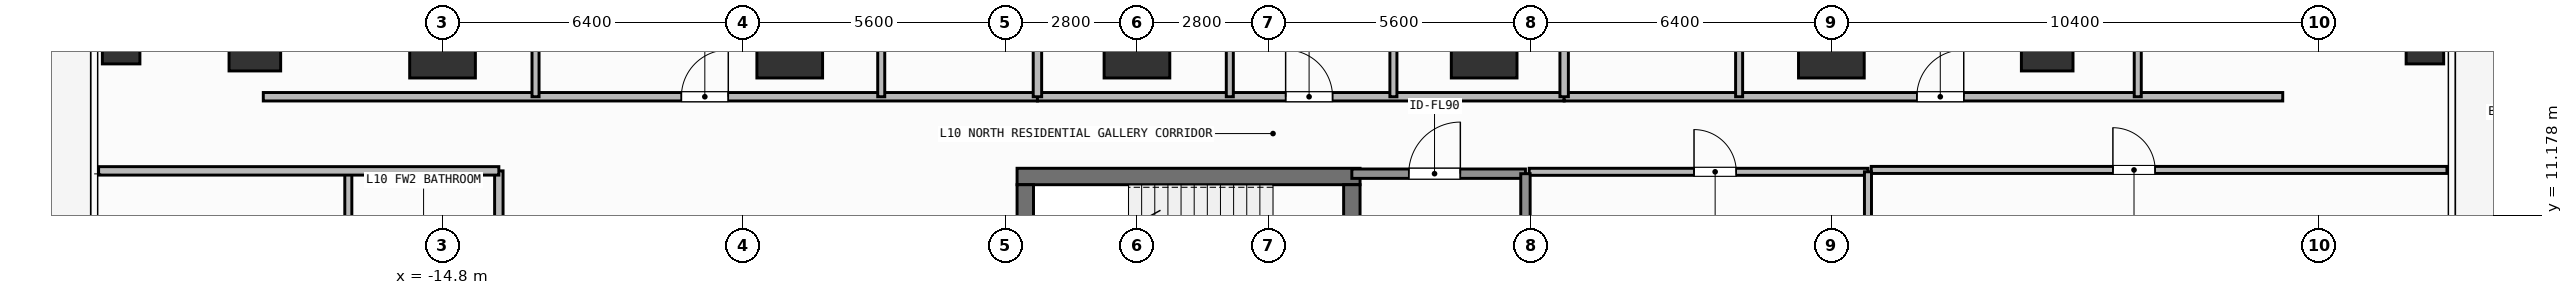
"""IFC4 building model, lengths in metres.
Left out: names, types, materials, properties, quantities, classifications, styles, units other than length and angle.
Written with IfcOpenShell. Run it as: python <this file> out.ifc"""

import sys

from ifc_helpers import new_model, si_unit, direction, frame, frame_2d, origin, origin_2d, place, context, subcontext, project, spatial, rectangle, hollow_rectangle, extrude, element, fill, save


model = new_model("IFC4")
c1 = context("Model", 3, precision=1e-05, world=origin(), true_north=direction((0.0, 1.0)))
c2 = subcontext(c1, "Body", "Model", "MODEL_VIEW")
j1 = project(units=[si_unit("LENGTHUNIT", "METRE"), si_unit("PLANEANGLEUNIT", "RADIAN")], contexts=[c1])
p1 = place(None, origin())
s1 = spatial("IfcSite", under=j1, at=p1, CompositionType="ELEMENT")
p2 = place(p1, origin())
s2 = spatial("IfcBuilding", under=s1, at=p2, CompositionType="ELEMENT")
p3 = place(p2, frame((0.0, 0.0, 38.4)))
s3 = spatial("IfcBuildingStorey", under=s2, at=p3, CompositionType="ELEMENT", Elevation=38.4)
p4 = place(p3, frame((-2.555, 12.0, 0.0), z_axis=(0.0, 0.0, 1.0), x_axis=(1.0, 0.0, 0.0)))
e1 = element("IfcWall", 1, at=p4, inside=s3, PredefinedType="SHEAR", context=c2, shape_type="SweptSolid", body=[
    extrude(rectangle(XDim=7.31, YDim=0.35, at=frame_2d((3.655, 0.0))), origin(), (0.0, 0.0, 1.0), 3.9),
])
p5 = place(p3, frame((-2.38, 8.9, 0.0), z_axis=(0.0, 0.0, 1.0), x_axis=(0.0, 1.0, 0.0)))
e2 = element("IfcWall", 2, at=p5, inside=s3, PredefinedType="SHEAR", context=c2, shape_type="SweptSolid", body=[
    extrude(rectangle(XDim=2.925, YDim=0.35, at=frame_2d((1.462, 0.0))), origin(), (0.0, 0.0, 1.0), 3.9),
])
p6 = place(p3, frame((4.58, 11.825, 0.0), z_axis=(0.0, 0.0, 1.0), x_axis=(0.0, -1.0, 0.0)))
e3 = element("IfcWall", 3, at=p6, inside=s3, PredefinedType="SHEAR", context=c2, shape_type="SweptSolid", body=[
    extrude(rectangle(XDim=2.925, YDim=0.35, at=frame_2d((1.462, 0.0))), origin(), (0.0, 0.0, 1.0), 3.9),
])
p7 = place(p6, frame((0.913, 0.0, 0.0)))
e4 = element("IfcOpeningElement", 4, at=p7, cuts=e3, PredefinedType="OPENING", context=c2, shape_type="SweptSolid", body=[
    extrude(rectangle(XDim=1.1, YDim=2.15, at=frame_2d((0.55, 1.075))), frame((0.0, 0.185, 0.0), z_axis=(0.0, -1.0, 0.0), x_axis=(1.0, 0.0, 0.0)), (0.0, 0.0, 1.0), 0.37),
])
for number, where, z_axis, x_axis in (
    (5, (-14.8, 14.8, 0.0), (0.0, 0.0, 1.0), (1.0, 0.0, 0.0)),
    (6, (-7.4, 14.8, 0.0), (0.0, 0.0, 1.0), (1.0, 0.0, 0.0)),
    (7, (0.0, 14.8, 0.0), (0.0, 0.0, 1.0), (1.0, 0.0, 0.0)),
    (8, (7.4, 14.8, 0.0), (0.0, 0.0, 1.0), (1.0, 0.0, 0.0)),
    (9, (14.8, 14.8, 0.0), (0.0, 0.0, 1.0), (1.0, 0.0, 0.0)),
):
    element("IfcColumn", number, at=place(p3, frame(where, z_axis=z_axis, x_axis=x_axis)), inside=s3, PredefinedType="COLUMN", context=c2, shape_type="SweptSolid", body=[
        extrude(rectangle(XDim=1.4, YDim=1.4, at=origin_2d()), origin(), (0.0, 0.0, 1.0), 3.9),
    ])
for number, where, z_axis, x_axis in (
    (10, (-18.8, 14.8, 0.0), (0.0, 0.0, 1.0), (1.0, 0.0, 0.0)),
    (11, (19.4, 14.8, 0.0), (0.0, 0.0, 1.0), (1.0, 0.0, 0.0)),
):
    element("IfcColumn", number, at=place(p3, frame(where, z_axis=z_axis, x_axis=x_axis)), inside=s3, PredefinedType="COLUMN", context=c2, shape_type="SweptSolid", body=[
        extrude(rectangle(XDim=1.1, YDim=1.1, at=origin_2d()), origin(), (0.0, 0.0, 1.0), 3.9),
    ])
for number, where, z_axis, x_axis in (
    (12, (-21.65, 14.8, 0.0), (0.0, 0.0, 1.0), (1.0, 0.0, 0.0)),
    (13, (27.45, 14.8, 0.0), (0.0, 0.0, 1.0), (1.0, 0.0, 0.0)),
):
    element("IfcColumn", number, at=place(p3, frame(where, z_axis=z_axis, x_axis=x_axis)), inside=s3, PredefinedType="COLUMN", context=c2, shape_type="SweptSolid", body=[
        extrude(hollow_rectangle(XDim=0.8, YDim=0.8, WallThickness=0.036, at=origin_2d()), origin(), (0.0, 0.0, 1.0), 3.9),
    ])
p8 = place(p3, frame((4.58, 12.06, 0.0), z_axis=(0.0, 0.0, 1.0), x_axis=(1.0, 0.0, 0.0)))
e14 = element("IfcWall", 14, at=p8, inside=s3, PredefinedType="SOLIDWALL", context=c2, shape_type="SweptSolid", body=[
    extrude(rectangle(XDim=3.7, YDim=0.2, at=frame_2d((1.85, 0.0))), origin(), (0.0, 0.0, 1.0), 3.68),
])
p9 = place(p8, frame((1.212, 0.0, 0.0)))
e15 = element("IfcOpeningElement", 15, at=p9, cuts=e14, PredefinedType="OPENING", context=c2, shape_type="SweptSolid", body=[
    extrude(rectangle(XDim=1.1, YDim=2.15, at=frame_2d((0.55, 1.075))), frame((0.0, 0.11, 0.0), z_axis=(0.0, -1.0, 0.0), x_axis=(1.0, 0.0, 0.0)), (0.0, 0.0, 1.0), 0.22),
])
p10 = place(p3, frame((8.36, 12.1, 0.0), z_axis=(0.0, 0.0, 1.0), x_axis=(1.0, 0.0, 0.0)))
e16 = element("IfcWall", 16, at=p10, inside=s3, PredefinedType="PARTITIONING", context=c2, shape_type="SweptSolid", body=[
    extrude(rectangle(XDim=7.22, YDim=0.15, at=frame_2d((3.61, 0.0))), origin(), (0.0, 0.0, 1.0), 3.68),
])
p11 = place(p10, frame((3.513, 0.0, 0.0)))
e17 = element("IfcOpeningElement", 17, at=p11, cuts=e16, PredefinedType="OPENING", context=c2, shape_type="SweptSolid", body=[
    extrude(rectangle(XDim=0.9, YDim=2.1, at=frame_2d((0.45, 1.05))), frame((0.0, 0.085, 0.0), z_axis=(0.0, -1.0, 0.0), x_axis=(1.0, 0.0, 0.0)), (0.0, 0.0, 1.0), 0.17),
])
p12 = place(p3, frame((-18.62, 13.7, 0.0), z_axis=(0.0, 0.0, 1.0), x_axis=(1.0, 0.0, 0.0)))
e18 = element("IfcWall", 18, at=p12, inside=s3, PredefinedType="PARTITIONING", context=c2, shape_type="SweptSolid", body=[
    extrude(rectangle(XDim=16.499, YDim=0.18, at=frame_2d((8.25, 0.0))), origin(), (0.0, 0.0, 1.0), 3.68),
])
p13 = place(p12, frame((8.91, 0.0, 0.0)))
e19 = element("IfcOpeningElement", 19, at=p13, cuts=e18, PredefinedType="OPENING", context=c2, shape_type="SweptSolid", body=[
    extrude(rectangle(XDim=1.0, YDim=2.2, at=frame_2d((0.5, 1.1))), frame((0.0, 0.1, 0.0), z_axis=(0.0, -1.0, 0.0), x_axis=(1.0, 0.0, 0.0)), (0.0, 0.0, 1.0), 0.2),
])
p14 = place(p3, frame((-12.818, 13.7, 0.0), z_axis=(0.0, 0.0, 1.0), x_axis=(0.0, 1.0, 0.0)))
e20 = element("IfcWall", 20, at=p14, inside=s3, PredefinedType="PARTITIONING", context=c2, shape_type="SweptSolid", body=[
    extrude(rectangle(XDim=7.09, YDim=0.15, at=frame_2d((3.545, 0.0))), origin(), (0.0, 0.0, 1.0), 3.68),
])
p15 = place(p14, frame((3.03, 0.0, 0.0)))
e21 = element("IfcOpeningElement", 21, at=p15, cuts=e20, PredefinedType="OPENING", context=c2, shape_type="SweptSolid", body=[
    extrude(rectangle(XDim=0.85, YDim=2.1, at=frame_2d((0.425, 1.05))), frame((0.0, 0.085, 0.0), z_axis=(0.0, -1.0, 0.0), x_axis=(1.0, 0.0, 0.0)), (0.0, 0.0, 1.0), 0.17),
])
p16 = place(p3, frame((-5.45, 13.7, 0.0), z_axis=(0.0, 0.0, 1.0), x_axis=(0.0, 1.0, 0.0)))
e22 = element("IfcWall", 22, at=p16, inside=s3, PredefinedType="PARTITIONING", context=c2, shape_type="SweptSolid", body=[
    extrude(rectangle(XDim=4.566, YDim=0.15, at=frame_2d((2.283, 0.0))), origin(), (0.0, 0.0, 1.0), 3.68),
])
p17 = place(p16, frame((1.948, 0.0, 0.0)))
e23 = element("IfcOpeningElement", 23, at=p17, cuts=e22, PredefinedType="OPENING", context=c2, shape_type="SweptSolid", body=[
    extrude(rectangle(XDim=0.85, YDim=2.1, at=frame_2d((0.425, 1.05))), frame((0.0, 0.085, 0.0), z_axis=(0.0, -1.0, 0.0), x_axis=(1.0, 0.0, 0.0)), (0.0, 0.0, 1.0), 0.17),
])
p18 = place(p3, frame((-2.121, 13.7, 0.0), z_axis=(0.0, 0.0, 1.0), x_axis=(1.0, 0.0, 0.0)))
e24 = element("IfcWall", 24, at=p18, inside=s3, PredefinedType="PARTITIONING", context=c2, shape_type="SweptSolid", body=[
    extrude(rectangle(XDim=11.226, YDim=0.18, at=frame_2d((5.613, 0.0))), origin(), (0.0, 0.0, 1.0), 3.68),
])
p19 = place(p18, frame((5.29, 0.0, 0.0)))
e25 = element("IfcOpeningElement", 25, at=p19, cuts=e24, PredefinedType="OPENING", context=c2, shape_type="SweptSolid", body=[
    extrude(rectangle(XDim=1.0, YDim=2.2, at=frame_2d((0.5, 1.1))), frame((0.0, 0.1, 0.0), z_axis=(0.0, -1.0, 0.0), x_axis=(1.0, 0.0, 0.0)), (0.0, 0.0, 1.0), 0.2),
])
p20 = place(p3, frame((1.979, 13.7, 0.0), z_axis=(0.0, 0.0, 1.0), x_axis=(0.0, 1.0, 0.0)))
e26 = element("IfcWall", 26, at=p20, inside=s3, PredefinedType="PARTITIONING", context=c2, shape_type="SweptSolid", body=[
    extrude(rectangle(XDim=7.09, YDim=0.15, at=frame_2d((3.545, 0.0))), origin(), (0.0, 0.0, 1.0), 3.68),
])
p21 = place(p20, frame((3.03, 0.0, 0.0)))
e27 = element("IfcOpeningElement", 27, at=p21, cuts=e26, PredefinedType="OPENING", context=c2, shape_type="SweptSolid", body=[
    extrude(rectangle(XDim=0.85, YDim=2.1, at=frame_2d((0.425, 1.05))), frame((0.0, 0.085, 0.0), z_axis=(0.0, -1.0, 0.0), x_axis=(1.0, 0.0, 0.0)), (0.0, 0.0, 1.0), 0.17),
])
p22 = place(p3, frame((5.466, 13.7, 0.0), z_axis=(0.0, 0.0, 1.0), x_axis=(0.0, 1.0, 0.0)))
e28 = element("IfcWall", 28, at=p22, inside=s3, PredefinedType="PARTITIONING", context=c2, shape_type="SweptSolid", body=[
    extrude(rectangle(XDim=7.09, YDim=0.15, at=frame_2d((3.545, 0.0))), origin(), (0.0, 0.0, 1.0), 3.68),
])
p23 = place(p22, frame((3.03, 0.0, 0.0)))
e29 = element("IfcOpeningElement", 29, at=p23, cuts=e28, PredefinedType="OPENING", context=c2, shape_type="SweptSolid", body=[
    extrude(rectangle(XDim=0.85, YDim=2.1, at=frame_2d((0.425, 1.05))), frame((0.0, 0.085, 0.0), z_axis=(0.0, -1.0, 0.0), x_axis=(1.0, 0.0, 0.0)), (0.0, 0.0, 1.0), 0.17),
])
p24 = place(p3, frame((9.105, 13.7, 0.0), z_axis=(0.0, 0.0, 1.0), x_axis=(1.0, 0.0, 0.0)))
e30 = element("IfcWall", 30, at=p24, inside=s3, PredefinedType="PARTITIONING", context=c2, shape_type="SweptSolid", body=[
    extrude(rectangle(XDim=15.315, YDim=0.18, at=frame_2d((7.657, 0.0))), origin(), (0.0, 0.0, 1.0), 3.68),
])
p25 = place(p24, frame((7.516, 0.0, 0.0)))
e31 = element("IfcOpeningElement", 31, at=p25, cuts=e30, PredefinedType="OPENING", context=c2, shape_type="SweptSolid", body=[
    extrude(rectangle(XDim=1.0, YDim=2.2, at=frame_2d((0.5, 1.1))), frame((0.0, 0.1, 0.0), z_axis=(0.0, -1.0, 0.0), x_axis=(1.0, 0.0, 0.0)), (0.0, 0.0, 1.0), 0.2),
])
p26 = place(p3, frame((12.834, 13.7, 0.0), z_axis=(0.0, 0.0, 1.0), x_axis=(0.0, 1.0, 0.0)))
e32 = element("IfcWall", 32, at=p26, inside=s3, PredefinedType="PARTITIONING", context=c2, shape_type="SweptSolid", body=[
    extrude(rectangle(XDim=7.09, YDim=0.15, at=frame_2d((3.545, 0.0))), origin(), (0.0, 0.0, 1.0), 3.68),
])
p27 = place(p26, frame((3.03, 0.0, 0.0)))
e33 = element("IfcOpeningElement", 33, at=p27, cuts=e32, PredefinedType="OPENING", context=c2, shape_type="SweptSolid", body=[
    extrude(rectangle(XDim=0.85, YDim=2.1, at=frame_2d((0.425, 1.05))), frame((0.0, 0.085, 0.0), z_axis=(0.0, -1.0, 0.0), x_axis=(1.0, 0.0, 0.0)), (0.0, 0.0, 1.0), 0.17),
])
p28 = place(p3, frame((21.33, 13.7, 0.0), z_axis=(0.0, 0.0, 1.0), x_axis=(0.0, 1.0, 0.0)))
e34 = element("IfcWall", 34, at=p28, inside=s3, PredefinedType="PARTITIONING", context=c2, shape_type="SweptSolid", body=[
    extrude(rectangle(XDim=4.148, YDim=0.15, at=frame_2d((2.074, 0.0))), origin(), (0.0, 0.0, 1.0), 3.68),
])
p29 = place(p28, frame((1.737, 0.0, 0.0)))
e35 = element("IfcOpeningElement", 35, at=p29, cuts=e34, PredefinedType="OPENING", context=c2, shape_type="SweptSolid", body=[
    extrude(rectangle(XDim=0.85, YDim=2.1, at=frame_2d((0.425, 1.05))), frame((0.0, 0.085, 0.0), z_axis=(0.0, -1.0, 0.0), x_axis=(1.0, 0.0, 0.0)), (0.0, 0.0, 1.0), 0.17),
])
p30 = place(p3, frame((-13.6, 0.727, 0.0), z_axis=(0.0, 0.0, 1.0), x_axis=(0.0, 1.0, 0.0)))
e36 = element("IfcWall", 36, at=p30, inside=s3, PredefinedType="PARTITIONING", context=c2, shape_type="SweptSolid", body=[
    extrude(rectangle(XDim=11.393, YDim=0.18, at=frame_2d((5.697, 0.0))), origin(), (0.0, 0.0, 1.0), 3.68),
])
p31 = place(p30, frame((4.837, 0.0, 0.0)))
e37 = element("IfcOpeningElement", 37, at=p31, cuts=e36, PredefinedType="OPENING", context=c2, shape_type="SweptSolid", body=[
    extrude(rectangle(XDim=1.0, YDim=2.2, at=frame_2d((0.5, 1.1))), frame((0.0, 0.1, 0.0), z_axis=(0.0, -1.0, 0.0), x_axis=(1.0, 0.0, 0.0)), (0.0, 0.0, 1.0), 0.2),
])
p32 = place(p3, frame((15.65, 12.14, 0.0), z_axis=(0.0, 0.0, 1.0), x_axis=(1.0, 0.0, 0.0)))
e38 = element("IfcWall", 38, at=p32, inside=s3, PredefinedType="PARTITIONING", context=c2, shape_type="SweptSolid", body=[
    extrude(rectangle(XDim=12.27, YDim=0.15, at=frame_2d((6.135, 0.0))), origin(), (0.0, 0.0, 1.0), 3.68),
])
p33 = place(p32, frame((5.15, 0.0, 0.0)))
e39 = element("IfcOpeningElement", 39, at=p33, cuts=e38, PredefinedType="OPENING", context=c2, shape_type="SweptSolid", body=[
    extrude(rectangle(XDim=0.9, YDim=2.1, at=frame_2d((0.45, 1.05))), frame((0.0, 0.085, 0.0), z_axis=(0.0, -1.0, 0.0), x_axis=(1.0, 0.0, 0.0)), (0.0, 0.0, 1.0), 0.17),
])
p34 = place(p3, frame((8.28, 8.95, 0.0), z_axis=(0.0, 0.0, 1.0), x_axis=(0.0, 1.0, 0.0)))
e40 = element("IfcWall", 40, at=p34, inside=s3, PredefinedType="SOLIDWALL", context=c2, shape_type="SweptSolid", body=[
    extrude(rectangle(XDim=3.11, YDim=0.2, at=frame_2d((1.555, 0.0))), origin(), (0.0, 0.0, 1.0), 3.68),
])
p35 = place(p3, frame((15.58, 5.85, 0.0), z_axis=(0.0, 0.0, 1.0), x_axis=(0.0, 1.0, 0.0)))
e41 = element("IfcWall", 41, at=p35, inside=s3, PredefinedType="PARTITIONING", context=c2, shape_type="SweptSolid", body=[
    extrude(rectangle(XDim=6.25, YDim=0.15, at=frame_2d((3.125, 0.0))), origin(), (0.0, 0.0, 1.0), 3.68),
])
for number, where, z_axis, x_axis in (
    (42, (-2.121, 13.7, 0.0), (0.0, 0.0, 1.0), (0.0, 1.0, 0.0)),
    (43, (9.105, 13.7, 0.0), (0.0, 0.0, 1.0), (0.0, 1.0, 0.0)),
):
    element("IfcWall", number, at=place(p3, frame(where, z_axis=z_axis, x_axis=x_axis)), inside=s3, PredefinedType="PARTITIONING", context=c2, shape_type="SweptSolid", body=[
        extrude(rectangle(XDim=11.33, YDim=0.18, at=frame_2d((5.665, 0.0))), origin(), (0.0, 0.0, 1.0), 3.68),
    ])
p36 = place(p3, frame((-16.808, 9.32, 0.0), z_axis=(0.0, 0.0, 1.0), x_axis=(0.0, 1.0, 0.0)))
e44 = element("IfcWall", 44, at=p36, inside=s3, PredefinedType="PARTITIONING", context=c2, shape_type="SweptSolid", body=[
    extrude(rectangle(XDim=2.8, YDim=0.15, at=frame_2d((1.4, 0.0))), origin(), (0.0, 0.0, 1.0), 3.68),
])
p37 = place(p3, frame((-22.13, 12.12, 0.0), z_axis=(0.0, 0.0, 1.0), x_axis=(1.0, 0.0, 0.0)))
e45 = element("IfcWall", 45, at=p37, inside=s3, PredefinedType="PARTITIONING", context=c2, shape_type="SweptSolid", body=[
    extrude(rectangle(XDim=8.53, YDim=0.18, at=frame_2d((4.265, 0.0))), origin(), (0.0, 0.0, 1.0), 3.68),
])
p38 = place(p9, origin())
e46 = element("IfcDoor", 46, at=p38, inside=s3, OperationType="SINGLE_SWING_RIGHT", PredefinedType="DOOR", context=c2, shape_type="SweptSolid", body=[
    extrude(rectangle(XDim=1.1, YDim=2.15, at=frame_2d((0.55, 1.075))), frame((0.0, 0.025, 0.0), z_axis=(0.0, -1.0, 0.0), x_axis=(1.0, 0.0, 0.0)), (0.0, 0.0, 1.0), 0.05),
])
fill(e15, e46)
p39 = place(p11, origin())
e47 = element("IfcDoor", 47, at=p39, inside=s3, OperationType="SINGLE_SWING_LEFT", PredefinedType="DOOR", context=c2, shape_type="SweptSolid", body=[
    extrude(rectangle(XDim=0.9, YDim=2.1, at=frame_2d((0.45, 1.05))), frame((0.0, 0.025, 0.0), z_axis=(0.0, -1.0, 0.0), x_axis=(1.0, 0.0, 0.0)), (0.0, 0.0, 1.0), 0.05),
])
fill(e17, e47)
p40 = place(p13, origin())
e48 = element("IfcDoor", 48, at=p40, inside=s3, OperationType="SINGLE_SWING_RIGHT", PredefinedType="DOOR", context=c2, shape_type="SweptSolid", body=[
    extrude(rectangle(XDim=1.0, YDim=2.2, at=frame_2d((0.5, 1.1))), frame((0.0, 0.025, 0.0), z_axis=(0.0, -1.0, 0.0), x_axis=(1.0, 0.0, 0.0)), (0.0, 0.0, 1.0), 0.05),
])
fill(e19, e48)
p41 = place(p19, origin())
e49 = element("IfcDoor", 49, at=p41, inside=s3, OperationType="SINGLE_SWING_LEFT", PredefinedType="DOOR", context=c2, shape_type="SweptSolid", body=[
    extrude(rectangle(XDim=1.0, YDim=2.2, at=frame_2d((0.5, 1.1))), frame((0.0, 0.025, 0.0), z_axis=(0.0, -1.0, 0.0), x_axis=(1.0, 0.0, 0.0)), (0.0, 0.0, 1.0), 0.05),
])
fill(e25, e49)
p42 = place(p25, origin())
e50 = element("IfcDoor", 50, at=p42, inside=s3, OperationType="SINGLE_SWING_RIGHT", PredefinedType="DOOR", context=c2, shape_type="SweptSolid", body=[
    extrude(rectangle(XDim=1.0, YDim=2.2, at=frame_2d((0.5, 1.1))), frame((0.0, 0.025, 0.0), z_axis=(0.0, -1.0, 0.0), x_axis=(1.0, 0.0, 0.0)), (0.0, 0.0, 1.0), 0.05),
])
fill(e31, e50)
p43 = place(p33, origin())
e51 = element("IfcDoor", 51, at=p43, inside=s3, OperationType="SINGLE_SWING_LEFT", PredefinedType="DOOR", context=c2, shape_type="SweptSolid", body=[
    extrude(rectangle(XDim=0.9, YDim=2.1, at=frame_2d((0.45, 1.05))), frame((0.0, 0.025, 0.0), z_axis=(0.0, -1.0, 0.0), x_axis=(1.0, 0.0, 0.0)), (0.0, 0.0, 1.0), 0.05),
])
fill(e39, e51)
save(model, sys.argv[1])
